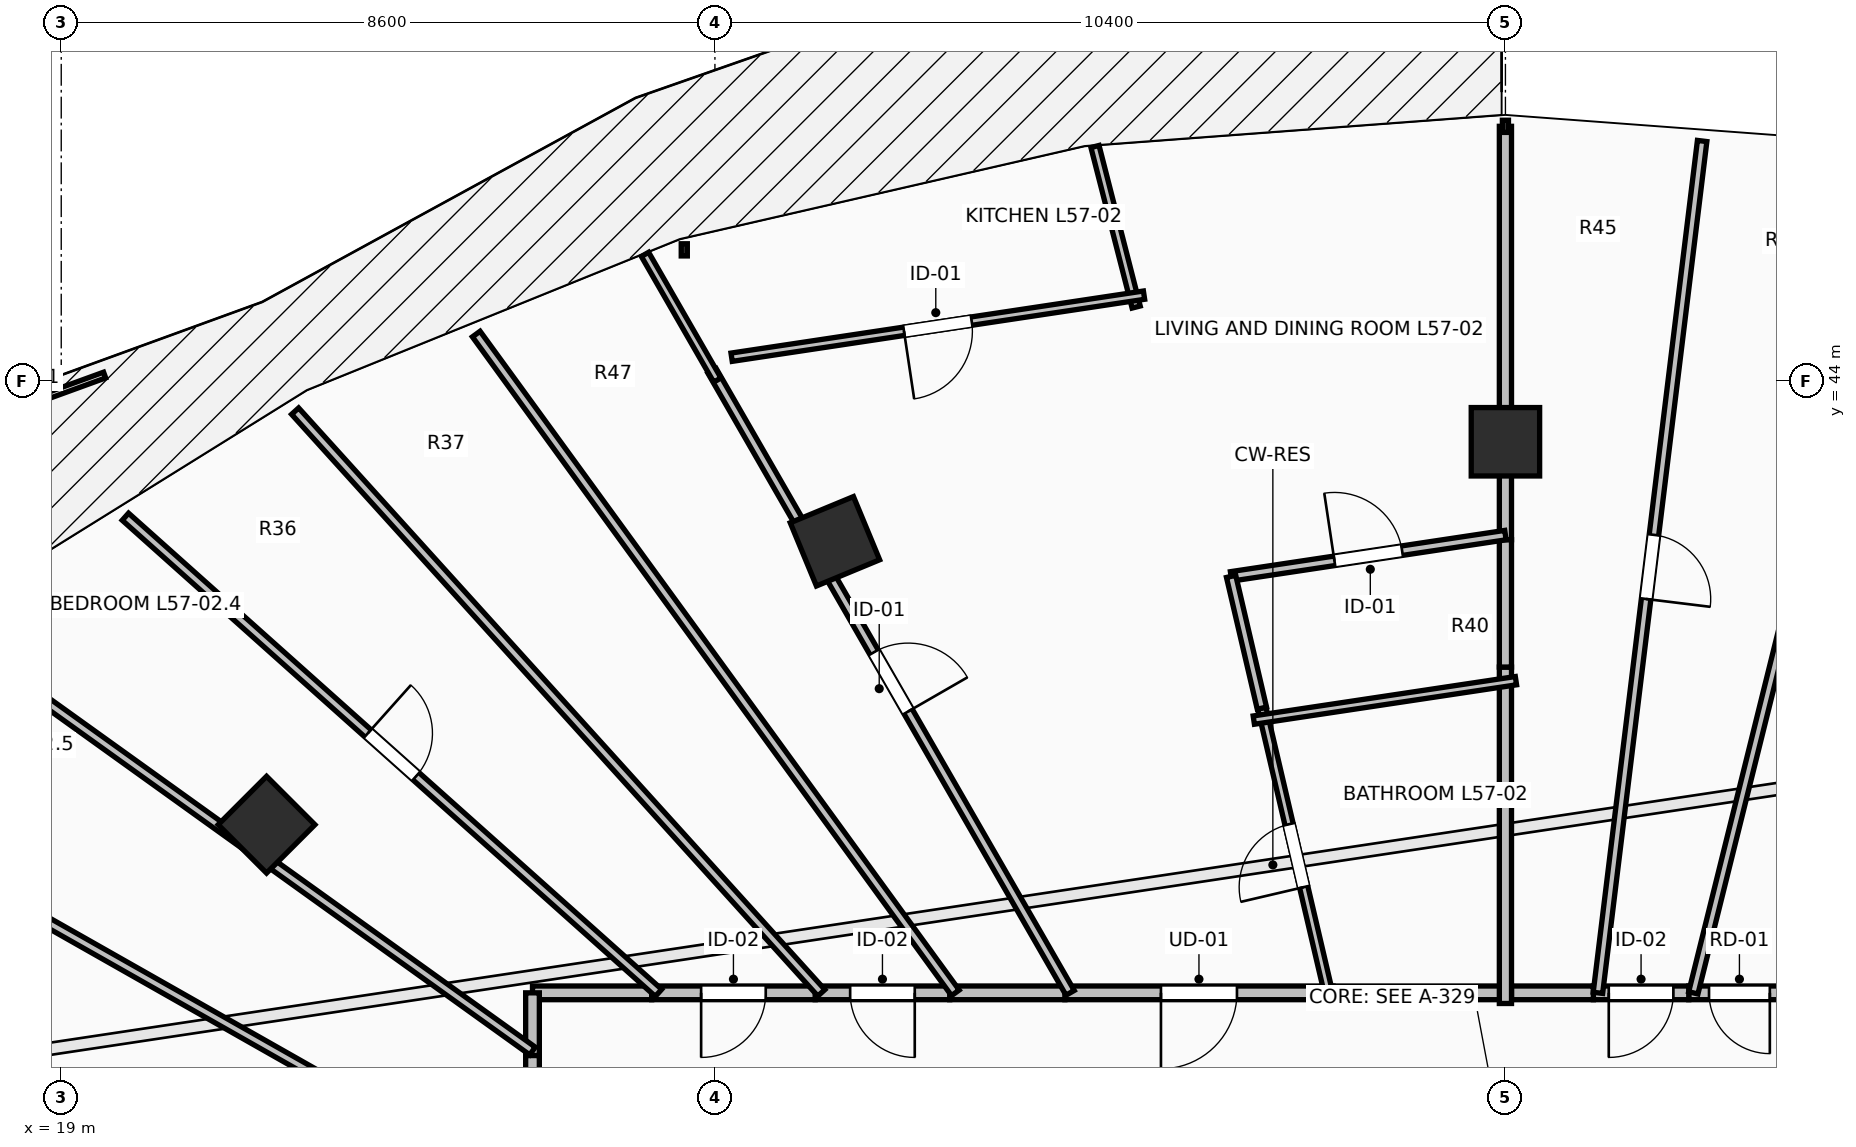
"""IFC4 building model, lengths in metres.
Left out: names, types, materials, properties, quantities, classifications, styles, units other than length and angle.
Written with IfcOpenShell. Run it as: python <this file> out.ifc"""

import sys

from ifc_helpers import new_model, si_unit, direction, frame, frame_2d, origin, origin_2d, place, context, subcontext, project, spatial, rectangle, extrude, element, fill, save


model = new_model("IFC4")
c1 = context("Model", 3, precision=1e-05, world=origin(), true_north=direction((0.0, 1.0)))
c2 = subcontext(c1, "Body", "Model", "MODEL_VIEW")
j1 = project(units=[si_unit("LENGTHUNIT", "METRE"), si_unit("PLANEANGLEUNIT", "RADIAN")], contexts=[c1])
p1 = place(None, origin())
s1 = spatial("IfcSite", under=j1, at=p1, CompositionType="ELEMENT")
p2 = place(p1, origin())
s2 = spatial("IfcBuilding", under=s1, at=p2, CompositionType="ELEMENT")
p3 = place(p2, frame((0.0, 0.0, 210.75)))
s3 = spatial("IfcBuildingStorey", under=s2, at=p3, CompositionType="ELEMENT", Elevation=210.75)
for number, where, z_axis, x_axis in (
    (1, (38.0, 43.2, 0.0), (0.0, 0.0, 1.0), (0.0, 1.0, 0.0)),
    (2, (29.179, 41.891, 0.0), (0.0, 0.0, 1.0), (-0.383, 0.924, 0.0)),
    (3, (21.701, 38.162, 0.0), (0.0, 0.0, 1.0), (-0.707, 0.707, 0.0)),
):
    element("IfcColumn", number, at=place(p3, frame(where, z_axis=z_axis, x_axis=x_axis)), inside=s3, PredefinedType="COLUMN", context=c2, shape_type="SweptSolid", body=[
        extrude(rectangle(XDim=0.9, YDim=0.9, at=origin_2d()), origin(), (0.0, 0.0, 1.0), 3.55),
    ])
p4 = place(p3, frame((41.745, 35.95, 0.0), z_axis=(0.0, 0.0, 1.0), x_axis=(-1.0, 0.0, 0.0)))
e4 = element("IfcWall", 4, at=p4, inside=s3, PredefinedType="PARTITIONING", context=c2, shape_type="SweptSolid", body=[
    extrude(rectangle(XDim=1.333, YDim=0.18, at=frame_2d((0.667, 0.0))), origin(), (0.0, 0.0, 1.0), 2.979),
])
p5 = place(p4, frame((0.267, 0.0, 0.0)))
e5 = element("IfcOpeningElement", 5, at=p5, cuts=e4, PredefinedType="OPENING", context=c2, shape_type="SweptSolid", body=[
    extrude(rectangle(XDim=0.8, YDim=2.05, at=frame_2d((0.4, 1.025))), frame((0.0, 0.105, 0.0), z_axis=(0.0, -1.0, 0.0), x_axis=(1.0, 0.0, 0.0)), (0.0, 0.0, 1.0), 0.21),
])
p6 = place(p3, frame((40.412, 35.95, 0.0), z_axis=(0.0, 0.0, 1.0), x_axis=(-1.0, 0.0, 0.0)))
e6 = element("IfcWall", 6, at=p6, inside=s3, PredefinedType="PARTITIONING", context=c2, shape_type="SweptSolid", body=[
    extrude(rectangle(XDim=1.255, YDim=0.18, at=frame_2d((0.627, 0.0))), origin(), (0.0, 0.0, 1.0), 2.979),
])
p7 = place(p6, frame((0.202, 0.0, 0.0)))
e7 = element("IfcOpeningElement", 7, at=p7, cuts=e6, PredefinedType="OPENING", context=c2, shape_type="SweptSolid", body=[
    extrude(rectangle(XDim=0.85, YDim=2.1, at=frame_2d((0.425, 1.05))), frame((0.0, 0.105, 0.0), z_axis=(0.0, -1.0, 0.0), x_axis=(1.0, 0.0, 0.0)), (0.0, 0.0, 1.0), 0.21),
])
p8 = place(p3, frame((39.157, 35.95, 0.0), z_axis=(0.0, 0.0, 1.0), x_axis=(-1.0, 0.0, 0.0)))
e8 = element("IfcWall", 8, at=p8, inside=s3, PredefinedType="PARTITIONING", context=c2, shape_type="SweptSolid", body=[
    extrude(rectangle(XDim=1.217, YDim=0.18, at=frame_2d((0.608, 0.0))), origin(), (0.0, 0.0, 1.0), 2.979),
])
p9 = place(p3, frame((35.732, 35.95, 0.0), z_axis=(0.0, 0.0, 1.0), x_axis=(-1.0, 0.0, 0.0)))
e9 = element("IfcWall", 9, at=p9, inside=s3, PredefinedType="PARTITIONING", context=c2, shape_type="SweptSolid", body=[
    extrude(rectangle(XDim=3.528, YDim=0.18, at=frame_2d((1.764, 0.0))), origin(), (0.0, 0.0, 1.0), 2.979),
])
p10 = place(p9, frame((1.264, 0.0, 0.0)))
e10 = element("IfcOpeningElement", 10, at=p10, cuts=e9, PredefinedType="OPENING", context=c2, shape_type="SweptSolid", body=[
    extrude(rectangle(XDim=1.0, YDim=2.15, at=frame_2d((0.5, 1.075))), frame((0.0, 0.105, 0.0), z_axis=(0.0, -1.0, 0.0), x_axis=(1.0, 0.0, 0.0)), (0.0, 0.0, 1.0), 0.21),
])
p11 = place(p3, frame((38.08, 35.95, 0.0), z_axis=(0.0, 0.0, 1.0), x_axis=(-1.0, 0.0, 0.0)))
e11 = element("IfcWall", 11, at=p11, inside=s3, PredefinedType="PARTITIONING", context=c2, shape_type="SweptSolid", body=[
    extrude(rectangle(XDim=2.488, YDim=0.18, at=frame_2d((1.244, 0.0))), origin(), (0.0, 0.0, 1.0), 2.979),
])
p12 = place(p3, frame((32.204, 35.95, 0.0), z_axis=(0.0, 0.0, 1.0), x_axis=(-1.0, 0.0, 0.0)))
e12 = element("IfcWall", 12, at=p12, inside=s3, PredefinedType="PARTITIONING", context=c2, shape_type="SweptSolid", body=[
    extrude(rectangle(XDim=1.515, YDim=0.18, at=frame_2d((0.758, 0.0))), origin(), (0.0, 0.0, 1.0), 3.29),
])
p13 = place(p3, frame((30.689, 35.95, 0.0), z_axis=(0.0, 0.0, 1.0), x_axis=(-1.0, 0.0, 0.0)))
e13 = element("IfcWall", 13, at=p13, inside=s3, PredefinedType="PARTITIONING", context=c2, shape_type="SweptSolid", body=[
    extrude(rectangle(XDim=1.77, YDim=0.18, at=frame_2d((0.885, 0.0))), origin(), (0.0, 0.0, 1.0), 2.482),
])
p14 = place(p13, frame((0.46, 0.0, 0.0)))
e14 = element("IfcOpeningElement", 14, at=p14, cuts=e13, PredefinedType="OPENING", context=c2, shape_type="SweptSolid", body=[
    extrude(rectangle(XDim=0.85, YDim=2.1, at=frame_2d((0.425, 1.05))), frame((0.0, 0.105, 0.0), z_axis=(0.0, -1.0, 0.0), x_axis=(1.0, 0.0, 0.0)), (0.0, 0.0, 1.0), 0.21),
])
p15 = place(p3, frame((28.919, 35.95, 0.0), z_axis=(0.0, 0.0, 1.0), x_axis=(-1.0, 0.0, 0.0)))
e15 = element("IfcWall", 15, at=p15, inside=s3, PredefinedType="PARTITIONING", context=c2, shape_type="SweptSolid", body=[
    extrude(rectangle(XDim=2.151, YDim=0.18, at=frame_2d((1.075, 0.0))), origin(), (0.0, 0.0, 1.0), 2.482),
])
p16 = place(p15, frame((0.65, 0.0, 0.0)))
e16 = element("IfcOpeningElement", 16, at=p16, cuts=e15, PredefinedType="OPENING", context=c2, shape_type="SweptSolid", body=[
    extrude(rectangle(XDim=0.85, YDim=2.1, at=frame_2d((0.425, 1.05))), frame((0.0, 0.105, 0.0), z_axis=(0.0, -1.0, 0.0), x_axis=(1.0, 0.0, 0.0)), (0.0, 0.0, 1.0), 0.21),
])
p17 = place(p3, frame((26.768, 35.95, 0.0), z_axis=(0.0, 0.0, 1.0), x_axis=(-1.0, 0.0, 0.0)))
e17 = element("IfcWall", 17, at=p17, inside=s3, PredefinedType="PARTITIONING", context=c2, shape_type="SweptSolid", body=[
    extrude(rectangle(XDim=1.568, YDim=0.18, at=frame_2d((0.784, 0.0))), origin(), (0.0, 0.0, 1.0), 3.29),
])
p18 = place(p3, frame((25.2, 35.95, 0.0), z_axis=(0.0, 0.0, 1.0), x_axis=(0.0, -1.0, 0.0)))
e18 = element("IfcWall", 18, at=p18, inside=s3, PredefinedType="PARTITIONING", context=c2, shape_type="SweptSolid", body=[
    extrude(rectangle(XDim=0.825, YDim=0.18, at=frame_2d((0.413, 0.0))), origin(), (0.0, 0.0, 1.0), 2.482),
])
p19 = place(p3, frame((25.2, 35.125, 0.0), z_axis=(0.0, 0.0, 1.0), x_axis=(0.0, -1.0, 0.0)))
e19 = element("IfcWall", 19, at=p19, inside=s3, PredefinedType="PARTITIONING", context=c2, shape_type="SweptSolid", body=[
    extrude(rectangle(XDim=1.926, YDim=0.18, at=frame_2d((0.963, 0.0))), origin(), (0.0, 0.0, 1.0), 2.482),
])
p20 = place(p19, frame((0.538, 0.0, 0.0)))
e20 = element("IfcOpeningElement", 20, at=p20, cuts=e19, PredefinedType="OPENING", context=c2, shape_type="SweptSolid", body=[
    extrude(rectangle(XDim=0.85, YDim=2.1, at=frame_2d((0.425, 1.05))), frame((0.0, 0.105, 0.0), z_axis=(0.0, -1.0, 0.0), x_axis=(1.0, 0.0, 0.0)), (0.0, 0.0, 1.0), 0.21),
])
p21 = place(p3, frame((43.207, 46.961, 0.0), z_axis=(0.0, 0.0, 1.0), x_axis=(-0.241072089133, -0.970507211638, 0.0)))
e21 = element("IfcWall", 21, at=p21, inside=s3, PredefinedType="PARTITIONING", context=c2, shape_type="SweptSolid", body=[
    extrude(rectangle(XDim=11.346, YDim=0.125, at=frame_2d((5.673, 0.0))), origin(), (0.0, 0.0, 1.0), 2.824),
])
p22 = place(p3, frame((40.588, 47.157, 0.0), z_axis=(0.0, 0.0, 1.0), x_axis=(-0.121415539359, -0.992601766471, 0.0)))
e22 = element("IfcWall", 22, at=p22, inside=s3, PredefinedType="PARTITIONING", context=c2, shape_type="SweptSolid", body=[
    extrude(rectangle(XDim=11.291, YDim=0.125, at=frame_2d((5.645, 0.0))), origin(), (0.0, 0.0, 1.0), 2.824),
])
p23 = place(p22, frame((5.22, 0.0, 0.0)))
e23 = element("IfcOpeningElement", 23, at=p23, cuts=e22, PredefinedType="OPENING", context=c2, shape_type="SweptSolid", body=[
    extrude(rectangle(XDim=0.85, YDim=2.1, at=frame_2d((0.425, 1.05))), frame((0.0, 0.077, 0.0), z_axis=(0.0, -1.0, 0.0), x_axis=(1.0, 0.0, 0.0)), (0.0, 0.0, 1.0), 0.155),
])
p24 = place(p3, frame((38.0, 47.35, 0.0), z_axis=(0.0, 0.0, 1.0), x_axis=(0.0, -1.0, 0.0)))
e24 = element("IfcWall", 24, at=p24, inside=s3, PredefinedType="PARTITIONING", context=c2, shape_type="SweptSolid", body=[
    extrude(rectangle(XDim=5.439, YDim=0.16, at=frame_2d((2.72, 0.0))), origin(), (0.0, 0.0, 1.0), 3.29),
])
p25 = place(p3, frame((38.0, 40.236, 0.0), z_axis=(0.0, 0.0, 1.0), x_axis=(0.0, -1.0, 0.0)))
e25 = element("IfcWall", 25, at=p25, inside=s3, PredefinedType="PARTITIONING", context=c2, shape_type="SweptSolid", body=[
    extrude(rectangle(XDim=4.426, YDim=0.16, at=frame_2d((2.213, 0.0))), origin(), (0.0, 0.0, 1.0), 2.936),
])
p26 = place(p3, frame((38.0, 41.911, 0.0), z_axis=(0.0, 0.0, 1.0), x_axis=(0.0, -1.0, 0.0)))
e26 = element("IfcWall", 26, at=p26, inside=s3, PredefinedType="PARTITIONING", context=c2, shape_type="SweptSolid", body=[
    extrude(rectangle(XDim=1.675, YDim=0.16, at=frame_2d((0.837, 0.0))), origin(), (0.0, 0.0, 1.0), 3.29),
])
p27 = place(p3, frame((35.704, 35.814, 0.0), z_axis=(0.0, 0.0, 1.0), x_axis=(-0.227707800263, 0.973729509515, 0.0)))
e27 = element("IfcWall", 27, at=p27, inside=s3, PredefinedType="PARTITIONING", context=c2, shape_type="SweptSolid", body=[
    extrude(rectangle(XDim=3.986, YDim=0.11, at=frame_2d((1.993, 0.0))), origin(), (0.0, 0.0, 1.0), 2.936),
])
p28 = place(p27, frame((1.568, 0.0, 0.0)))
e28 = element("IfcOpeningElement", 28, at=p28, cuts=e27, PredefinedType="OPENING", context=c2, shape_type="SweptSolid", body=[
    extrude(rectangle(XDim=0.85, YDim=2.1, at=frame_2d((0.425, 1.05))), frame((0.0, 0.07, 0.0), z_axis=(0.0, -1.0, 0.0), x_axis=(1.0, 0.0, 0.0)), (0.0, 0.0, 1.0), 0.14),
])
p29 = place(p3, frame((32.6, 47.085, 0.0), z_axis=(0.0, 0.0, 1.0), x_axis=(0.248431915259, -0.96864936044, 0.0)))
e29 = element("IfcWall", 29, at=p29, inside=s3, PredefinedType="PARTITIONING", context=c2, shape_type="SweptSolid", body=[
    extrude(rectangle(XDim=2.181, YDim=0.11, at=frame_2d((1.09, 0.0))), origin(), (0.0, 0.0, 1.0), 3.29),
])
p30 = place(p3, frame((33.245, 45.129, 0.0), z_axis=(0.0, 0.0, 1.0), x_axis=(-0.988861815895, -0.148836517916, 0.0)))
e30 = element("IfcWall", 30, at=p30, inside=s3, PredefinedType="PARTITIONING", context=c2, shape_type="SweptSolid", body=[
    extrude(rectangle(XDim=5.487, YDim=0.11, at=frame_2d((2.743, 0.0))), origin(), (0.0, 0.0, 1.0), 3.29),
])
p31 = place(p30, frame((2.293, 0.0, 0.0)))
e31 = element("IfcOpeningElement", 31, at=p31, cuts=e30, PredefinedType="OPENING", context=c2, shape_type="SweptSolid", body=[
    extrude(rectangle(XDim=0.9, YDim=2.1, at=frame_2d((0.45, 1.05))), frame((0.0, 0.07, 0.0), z_axis=(0.0, -1.0, 0.0), x_axis=(1.0, 0.0, 0.0)), (0.0, 0.0, 1.0), 0.14),
])
p32 = place(p3, frame((34.391, 41.429, 0.0), z_axis=(0.0, 0.0, 1.0), x_axis=(0.988870503719, 0.148778785027, 0.0)))
e32 = element("IfcWall", 32, at=p32, inside=s3, PredefinedType="PARTITIONING", context=c2, shape_type="SweptSolid", body=[
    extrude(rectangle(XDim=3.649, YDim=0.125, at=frame_2d((1.825, 0.0))), origin(), (0.0, 0.0, 1.0), 2.482),
])
p33 = place(p32, frame((1.375, 0.0, 0.0)))
e33 = element("IfcOpeningElement", 33, at=p33, cuts=e32, PredefinedType="OPENING", context=c2, shape_type="SweptSolid", body=[
    extrude(rectangle(XDim=0.9, YDim=2.1, at=frame_2d((0.45, 1.05))), frame((0.0, 0.077, 0.0), z_axis=(0.0, -1.0, 0.0), x_axis=(1.0, 0.0, 0.0)), (0.0, 0.0, 1.0), 0.155),
])
p34 = place(p3, frame((34.796, 39.695, 0.0), z_axis=(0.0, 0.0, 1.0), x_axis=(-0.227502715531, 0.973777446045, 0.0)))
e34 = element("IfcWall", 34, at=p34, inside=s3, PredefinedType="PARTITIONING", context=c2, shape_type="SweptSolid", body=[
    extrude(rectangle(XDim=1.78, YDim=0.125, at=frame_2d((0.89, 0.0))), origin(), (0.0, 0.0, 1.0), 2.482),
])
p35 = place(p3, frame((27.562, 44.133, 0.0), z_axis=(0.0, 0.0, 1.0), x_axis=(0.498920898859, -0.866647527361, 0.0)))
e35 = element("IfcWall", 35, at=p35, inside=s3, PredefinedType="PARTITIONING", context=c2, shape_type="SweptSolid", body=[
    extrude(rectangle(XDim=9.442, YDim=0.125, at=frame_2d((4.721, 0.0))), origin(), (0.0, 0.0, 1.0), 2.482),
])
p36 = place(p35, frame((4.271, 0.0, 0.0)))
e36 = element("IfcOpeningElement", 36, at=p36, cuts=e35, PredefinedType="OPENING", context=c2, shape_type="SweptSolid", body=[
    extrude(rectangle(XDim=0.9, YDim=2.1, at=frame_2d((0.45, 1.05))), frame((0.0, 0.077, 0.0), z_axis=(0.0, -1.0, 0.0), x_axis=(1.0, 0.0, 0.0)), (0.0, 0.0, 1.0), 0.155),
])
p37 = place(p3, frame((38.138, 40.057, 0.0), z_axis=(0.0, 0.0, 1.0), x_axis=(-0.988873620703, -0.14875806626, 0.0)))
e37 = element("IfcWall", 37, at=p37, inside=s3, PredefinedType="PARTITIONING", context=c2, shape_type="SweptSolid", body=[
    extrude(rectangle(XDim=3.488, YDim=0.11, at=frame_2d((1.744, 0.0))), origin(), (0.0, 0.0, 1.0), 2.936),
])
p38 = place(p3, frame((26.68, 45.665, 0.0), z_axis=(0.0, 0.0, 1.0), x_axis=(0.498810083909, -0.866711313062, 0.0)))
e38 = element("IfcWall", 38, at=p38, inside=s3, PredefinedType="PARTITIONING", context=c2, shape_type="SweptSolid", body=[
    extrude(rectangle(XDim=1.908, YDim=0.11, at=frame_2d((0.954, 0.0))), origin(), (0.0, 0.0, 1.0), 3.29),
])
p39 = place(p3, frame((24.46, 44.617, 0.0), z_axis=(0.0, 0.0, 1.0), x_axis=(0.588154087929, -0.808748891098, 0.0)))
e39 = element("IfcWall", 39, at=p39, inside=s3, PredefinedType="PARTITIONING", context=c2, shape_type="SweptSolid", body=[
    extrude(rectangle(XDim=10.717, YDim=0.125, at=frame_2d((5.358, 0.0))), origin(), (0.0, 0.0, 1.0), 2.482),
])
p40 = place(p3, frame((22.077, 43.603, 0.0), z_axis=(0.0, 0.0, 1.0), x_axis=(0.670853853748, -0.741589581177, 0.0)))
e40 = element("IfcWall", 40, at=p40, inside=s3, PredefinedType="PARTITIONING", context=c2, shape_type="SweptSolid", body=[
    extrude(rectangle(XDim=10.32, YDim=0.125, at=frame_2d((5.16, 0.0))), origin(), (0.0, 0.0, 1.0), 2.482),
])
p41 = place(p3, frame((19.844, 42.214, 0.0), z_axis=(0.0, 0.0, 1.0), x_axis=(0.745845988041, -0.666118429502, 0.0)))
e41 = element("IfcWall", 41, at=p41, inside=s3, PredefinedType="PARTITIONING", context=c2, shape_type="SweptSolid", body=[
    extrude(rectangle(XDim=9.404, YDim=0.125, at=frame_2d((4.702, 0.0))), origin(), (0.0, 0.0, 1.0), 2.824),
])
p42 = place(p41, frame((4.277, 0.0, 0.0)))
e42 = element("IfcOpeningElement", 42, at=p42, cuts=e41, PredefinedType="OPENING", context=c2, shape_type="SweptSolid", body=[
    extrude(rectangle(XDim=0.85, YDim=2.1, at=frame_2d((0.425, 1.05))), frame((0.0, 0.077, 0.0), z_axis=(0.0, -1.0, 0.0), x_axis=(1.0, 0.0, 0.0)), (0.0, 0.0, 1.0), 0.155),
])
p43 = place(p3, frame((17.568, 40.662, 0.0), z_axis=(0.0, 0.0, 1.0), x_axis=(0.812435479674, -0.583051105279, 0.0)))
e43 = element("IfcWall", 43, at=p43, inside=s3, PredefinedType="PARTITIONING", context=c2, shape_type="SweptSolid", body=[
    extrude(rectangle(XDim=9.394, YDim=0.125, at=frame_2d((4.697, 0.0))), origin(), (0.0, 0.0, 1.0), 2.482),
])
p44 = place(p3, frame((15.505, 38.758, 0.0), z_axis=(0.0, 0.0, 1.0), x_axis=(0.86982387552, -0.49336236741, 0.0)))
e44 = element("IfcWall", 44, at=p44, inside=s3, PredefinedType="PARTITIONING", context=c2, shape_type="SweptSolid", body=[
    extrude(rectangle(XDim=11.146, YDim=0.125, at=frame_2d((5.573, 0.0))), origin(), (0.0, 0.0, 1.0), 2.824),
])
p45 = place(p3, frame((13.622, 36.578, 0.0), z_axis=(0.0, 0.0, 1.0), x_axis=(0.917357672996, -0.398063939331, 0.0)))
e45 = element("IfcWall", 45, at=p45, inside=s3, PredefinedType="PARTITIONING", context=c2, shape_type="SweptSolid", body=[
    extrude(rectangle(XDim=12.621, YDim=0.125, at=frame_2d((6.311, 0.0))), origin(), (0.0, 0.0, 1.0), 2.824),
])
p46 = place(p10, origin())
e46 = element("IfcDoor", 46, at=p46, inside=s3, OperationType="SINGLE_SWING_RIGHT", PredefinedType="DOOR", context=c2, shape_type="SweptSolid", body=[
    extrude(rectangle(XDim=1.0, YDim=2.15, at=frame_2d((0.5, 1.075))), frame((0.0, 0.025, 0.0), z_axis=(0.0, -1.0, 0.0), x_axis=(1.0, 0.0, 0.0)), (0.0, 0.0, 1.0), 0.05),
])
fill(e10, e46)
p47 = place(p28, origin())
e47 = element("IfcDoor", 47, at=p47, inside=s3, OperationType="SINGLE_SWING_LEFT", PredefinedType="DOOR", context=c2, shape_type="SweptSolid", body=[
    extrude(rectangle(XDim=0.85, YDim=2.1, at=frame_2d((0.425, 1.05))), frame((0.0, 0.025, 0.0), z_axis=(0.0, -1.0, 0.0), x_axis=(1.0, 0.0, 0.0)), (0.0, 0.0, 1.0), 0.05),
])
fill(e28, e47)
p48 = place(p31, origin())
e48 = element("IfcDoor", 48, at=p48, inside=s3, OperationType="SINGLE_SWING_RIGHT", PredefinedType="DOOR", context=c2, shape_type="SweptSolid", body=[
    extrude(rectangle(XDim=0.9, YDim=2.1, at=frame_2d((0.45, 1.05))), frame((0.0, 0.025, 0.0), z_axis=(0.0, -1.0, 0.0), x_axis=(1.0, 0.0, 0.0)), (0.0, 0.0, 1.0), 0.05),
])
fill(e31, e48)
p49 = place(p33, origin())
e49 = element("IfcDoor", 49, at=p49, inside=s3, OperationType="SINGLE_SWING_LEFT", PredefinedType="DOOR", context=c2, shape_type="SweptSolid", body=[
    extrude(rectangle(XDim=0.9, YDim=2.1, at=frame_2d((0.45, 1.05))), frame((0.0, 0.025, 0.0), z_axis=(0.0, -1.0, 0.0), x_axis=(1.0, 0.0, 0.0)), (0.0, 0.0, 1.0), 0.05),
])
fill(e33, e49)
p50 = place(p36, origin())
e50 = element("IfcDoor", 50, at=p50, inside=s3, OperationType="SINGLE_SWING_RIGHT", PredefinedType="DOOR", context=c2, shape_type="SweptSolid", body=[
    extrude(rectangle(XDim=0.9, YDim=2.1, at=frame_2d((0.45, 1.05))), frame((0.0, 0.025, 0.0), z_axis=(0.0, -1.0, 0.0), x_axis=(1.0, 0.0, 0.0)), (0.0, 0.0, 1.0), 0.05),
])
fill(e36, e50)
p51 = place(p5, origin())
e51 = element("IfcDoor", 51, at=p51, inside=s3, OperationType="SINGLE_SWING_LEFT", PredefinedType="DOOR", context=c2, shape_type="SweptSolid", body=[
    extrude(rectangle(XDim=0.8, YDim=2.05, at=frame_2d((0.4, 1.025))), frame((0.0, 0.025, 0.0), z_axis=(0.0, -1.0, 0.0), x_axis=(1.0, 0.0, 0.0)), (0.0, 0.0, 1.0), 0.05),
])
fill(e5, e51)
p52 = place(p7, origin())
e52 = element("IfcDoor", 52, at=p52, inside=s3, OperationType="SINGLE_SWING_RIGHT", PredefinedType="DOOR", context=c2, shape_type="SweptSolid", body=[
    extrude(rectangle(XDim=0.85, YDim=2.1, at=frame_2d((0.425, 1.05))), frame((0.0, 0.025, 0.0), z_axis=(0.0, -1.0, 0.0), x_axis=(1.0, 0.0, 0.0)), (0.0, 0.0, 1.0), 0.05),
])
fill(e7, e52)
p53 = place(p14, origin())
e53 = element("IfcDoor", 53, at=p53, inside=s3, OperationType="SINGLE_SWING_LEFT", PredefinedType="DOOR", context=c2, shape_type="SweptSolid", body=[
    extrude(rectangle(XDim=0.85, YDim=2.1, at=frame_2d((0.425, 1.05))), frame((0.0, 0.025, 0.0), z_axis=(0.0, -1.0, 0.0), x_axis=(1.0, 0.0, 0.0)), (0.0, 0.0, 1.0), 0.05),
])
fill(e14, e53)
p54 = place(p16, origin())
e54 = element("IfcDoor", 54, at=p54, inside=s3, OperationType="SINGLE_SWING_RIGHT", PredefinedType="DOOR", context=c2, shape_type="SweptSolid", body=[
    extrude(rectangle(XDim=0.85, YDim=2.1, at=frame_2d((0.425, 1.05))), frame((0.0, 0.025, 0.0), z_axis=(0.0, -1.0, 0.0), x_axis=(1.0, 0.0, 0.0)), (0.0, 0.0, 1.0), 0.05),
])
fill(e16, e54)
p55 = place(p23, origin())
e55 = element("IfcDoor", 55, at=p55, inside=s3, OperationType="SINGLE_SWING_RIGHT", PredefinedType="DOOR", context=c2, shape_type="SweptSolid", body=[
    extrude(rectangle(XDim=0.85, YDim=2.1, at=frame_2d((0.425, 1.05))), frame((0.0, 0.025, 0.0), z_axis=(0.0, -1.0, 0.0), x_axis=(1.0, 0.0, 0.0)), (0.0, 0.0, 1.0), 0.05),
])
fill(e23, e55)
p56 = place(p42, origin())
e56 = element("IfcDoor", 56, at=p56, inside=s3, OperationType="SINGLE_SWING_LEFT", PredefinedType="DOOR", context=c2, shape_type="SweptSolid", body=[
    extrude(rectangle(XDim=0.85, YDim=2.1, at=frame_2d((0.425, 1.05))), frame((0.0, 0.025, 0.0), z_axis=(0.0, -1.0, 0.0), x_axis=(1.0, 0.0, 0.0)), (0.0, 0.0, 1.0), 0.05),
])
fill(e42, e56)
save(model, sys.argv[1])
